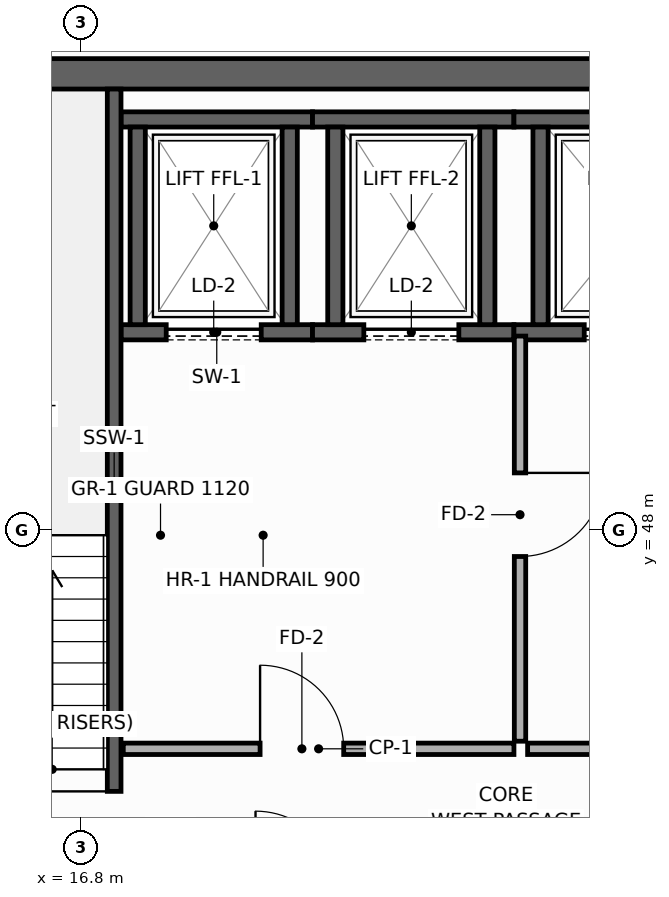
"""IFC4 building model, lengths in metres.
Left out: names, types, materials, properties, quantities, classifications, styles, units other than length and angle.
Written with IfcOpenShell. Run it as: python <this file> out.ifc"""

import sys

from ifc_helpers import new_model, si_unit, direction, frame, frame_2d, origin, place, context, subcontext, project, spatial, rectangle, extrude, element, fill, save


model = new_model("IFC4")
c1 = context("Model", 3, precision=1e-05, world=origin(), true_north=direction((0.0, 1.0)))
c2 = subcontext(c1, "Body", "Model", "MODEL_VIEW")
j1 = project(units=[si_unit("LENGTHUNIT", "METRE"), si_unit("PLANEANGLEUNIT", "RADIAN")], contexts=[c1])
p1 = place(None, origin())
s1 = spatial("IfcSite", under=j1, at=p1, CompositionType="ELEMENT")
p2 = place(p1, origin())
s2 = spatial("IfcBuilding", under=s1, at=p2, CompositionType="ELEMENT")
p3 = place(p2, frame((0.0, 0.0, 319.2)))
s3 = spatial("IfcBuildingStorey", under=s2, at=p3, CompositionType="ELEMENT", Elevation=319.2)
p4 = place(p3, frame((13.7, 54.0, 0.0), z_axis=(0.0, 0.0, 1.0), x_axis=(1.0, 0.0, 0.0)))
e1 = element("IfcWall", 1, at=p4, inside=s3, PredefinedType="SHEAR", context=c2, shape_type="SweptSolid", body=[
    extrude(rectangle(XDim=32.5, YDim=0.4, at=frame_2d((16.25, 0.0))), origin(), (0.0, 0.0, 1.0), 3.95),
])
p5 = place(p3, frame((17.33, 50.6, 0.0), z_axis=(0.0, 0.0, 1.0), x_axis=(1.0, 0.0, 0.0)))
e2 = element("IfcWall", 2, at=p5, inside=s3, PredefinedType="SHEAR", context=c2, shape_type="SweptSolid", body=[
    extrude(rectangle(XDim=2.52, YDim=0.2, at=frame_2d((1.26, 0.0))), origin(), (0.0, 0.0, 1.0), 3.95),
])
p6 = place(p5, frame((0.595, 0.0, 0.0)))
e3 = element("IfcOpeningElement", 3, at=p6, cuts=e2, PredefinedType="OPENING", context=c2, shape_type="SweptSolid", body=[
    extrude(rectangle(XDim=1.25, YDim=2.3, at=frame_2d((0.625, 1.15))), frame((0.0, 0.11, 0.0), z_axis=(0.0, -1.0, 0.0), x_axis=(1.0, 0.0, 0.0)), (0.0, 0.0, 1.0), 0.22),
])
p7 = place(p3, frame((17.33, 53.4, 0.0), z_axis=(0.0, 0.0, 1.0), x_axis=(1.0, 0.0, 0.0)))
e4 = element("IfcWall", 4, at=p7, inside=s3, PredefinedType="SHEAR", context=c2, shape_type="SweptSolid", body=[
    extrude(rectangle(XDim=2.52, YDim=0.2, at=frame_2d((1.26, 0.0))), origin(), (0.0, 0.0, 1.0), 3.95),
])
for number, where, z_axis, x_axis in (
    (5, (17.55, 50.7, 0.0), (0.0, 0.0, 1.0), (0.0, 1.0, 0.0)),
    (6, (19.55, 50.7, 0.0), (0.0, 0.0, 1.0), (0.0, 1.0, 0.0)),
):
    element("IfcWall", number, at=place(p3, frame(where, z_axis=z_axis, x_axis=x_axis)), inside=s3, PredefinedType="SHEAR", context=c2, shape_type="SweptSolid", body=[
        extrude(rectangle(XDim=2.6, YDim=0.2, at=frame_2d((1.3, 0.0))), origin(), (0.0, 0.0, 1.0), 3.95),
    ])
p8 = place(p3, frame((19.85, 50.6, 0.0), z_axis=(0.0, 0.0, 1.0), x_axis=(1.0, 0.0, 0.0)))
e7 = element("IfcWall", 7, at=p8, inside=s3, PredefinedType="SHEAR", context=c2, shape_type="SweptSolid", body=[
    extrude(rectangle(XDim=2.65, YDim=0.2, at=frame_2d((1.325, 0.0))), origin(), (0.0, 0.0, 1.0), 3.95),
])
p9 = place(p8, frame((0.675, 0.0, 0.0)))
e8 = element("IfcOpeningElement", 8, at=p9, cuts=e7, PredefinedType="OPENING", context=c2, shape_type="SweptSolid", body=[
    extrude(rectangle(XDim=1.25, YDim=2.3, at=frame_2d((0.625, 1.15))), frame((0.0, 0.11, 0.0), z_axis=(0.0, -1.0, 0.0), x_axis=(1.0, 0.0, 0.0)), (0.0, 0.0, 1.0), 0.22),
])
p10 = place(p3, frame((19.85, 53.4, 0.0), z_axis=(0.0, 0.0, 1.0), x_axis=(1.0, 0.0, 0.0)))
e9 = element("IfcWall", 9, at=p10, inside=s3, PredefinedType="SHEAR", context=c2, shape_type="SweptSolid", body=[
    extrude(rectangle(XDim=2.65, YDim=0.2, at=frame_2d((1.325, 0.0))), origin(), (0.0, 0.0, 1.0), 3.95),
])
for number, where, z_axis, x_axis in (
    (10, (20.15, 50.7, 0.0), (0.0, 0.0, 1.0), (0.0, 1.0, 0.0)),
    (11, (22.15, 50.7, 0.0), (0.0, 0.0, 1.0), (0.0, 1.0, 0.0)),
):
    element("IfcWall", number, at=place(p3, frame(where, z_axis=z_axis, x_axis=x_axis)), inside=s3, PredefinedType="SHEAR", context=c2, shape_type="SweptSolid", body=[
        extrude(rectangle(XDim=2.6, YDim=0.2, at=frame_2d((1.3, 0.0))), origin(), (0.0, 0.0, 1.0), 3.95),
    ])
p11 = place(p3, frame((22.5, 50.6, 0.0), z_axis=(0.0, 0.0, 1.0), x_axis=(1.0, 0.0, 0.0)))
e12 = element("IfcWall", 12, at=p11, inside=s3, PredefinedType="SHEAR", context=c2, shape_type="SweptSolid", body=[
    extrude(rectangle(XDim=2.85, YDim=0.2, at=frame_2d((1.425, 0.0))), origin(), (0.0, 0.0, 1.0), 3.95),
])
p12 = place(p11, frame((0.925, 0.0, 0.0)))
e13 = element("IfcOpeningElement", 13, at=p12, cuts=e12, PredefinedType="OPENING", context=c2, shape_type="SweptSolid", body=[
    extrude(rectangle(XDim=1.25, YDim=2.3, at=frame_2d((0.625, 1.15))), frame((0.0, 0.11, 0.0), z_axis=(0.0, -1.0, 0.0), x_axis=(1.0, 0.0, 0.0)), (0.0, 0.0, 1.0), 0.22),
])
p13 = place(p3, frame((22.5, 53.4, 0.0), z_axis=(0.0, 0.0, 1.0), x_axis=(1.0, 0.0, 0.0)))
e14 = element("IfcWall", 14, at=p13, inside=s3, PredefinedType="SHEAR", context=c2, shape_type="SweptSolid", body=[
    extrude(rectangle(XDim=2.85, YDim=0.2, at=frame_2d((1.425, 0.0))), origin(), (0.0, 0.0, 1.0), 3.95),
])
p14 = place(p3, frame((22.85, 50.7, 0.0), z_axis=(0.0, 0.0, 1.0), x_axis=(0.0, 1.0, 0.0)))
e15 = element("IfcWall", 15, at=p14, inside=s3, PredefinedType="SHEAR", context=c2, shape_type="SweptSolid", body=[
    extrude(rectangle(XDim=2.6, YDim=0.2, at=frame_2d((1.3, 0.0))), origin(), (0.0, 0.0, 1.0), 3.95),
])
p15 = place(p3, frame((17.24, 43.4, 0.0), z_axis=(0.0, 0.0, 1.0), x_axis=(0.0, 1.0, 0.0)))
e16 = element("IfcWall", 16, at=p15, inside=s3, PredefinedType="SHEAR", context=c2, shape_type="SweptSolid", body=[
    extrude(rectangle(XDim=10.4, YDim=0.18, at=frame_2d((5.2, 0.0))), origin(), (0.0, 0.0, 1.0), 3.95),
])
p16 = place(p15, frame((0.16, 0.0, 0.0)))
e17 = element("IfcOpeningElement", 17, at=p16, cuts=e16, PredefinedType="OPENING", context=c2, shape_type="SweptSolid", body=[
    extrude(rectangle(XDim=1.0, YDim=2.15, at=frame_2d((0.5, 1.075))), frame((0.0, 0.1, 0.0), z_axis=(0.0, -1.0, 0.0), x_axis=(1.0, 0.0, 0.0)), (0.0, 0.0, 1.0), 0.2),
])
p17 = place(p3, frame((17.36, 45.12, 0.0), z_axis=(0.0, 0.0, 1.0), x_axis=(1.0, 0.0, 0.0)))
e18 = element("IfcWall", 18, at=p17, inside=s3, PredefinedType="PARTITIONING", context=c2, shape_type="SweptSolid", body=[
    extrude(rectangle(XDim=5.14, YDim=0.15, at=frame_2d((2.57, 0.0))), origin(), (0.0, 0.0, 1.0), 3.95),
])
p18 = place(p17, frame((1.8, 0.0, 0.0)))
e19 = element("IfcOpeningElement", 19, at=p18, cuts=e18, PredefinedType="OPENING", context=c2, shape_type="SweptSolid", body=[
    extrude(rectangle(XDim=1.1, YDim=2.15, at=frame_2d((0.55, 1.075))), frame((0.0, 0.085, 0.0), z_axis=(0.0, -1.0, 0.0), x_axis=(1.0, 0.0, 0.0)), (0.0, 0.0, 1.0), 0.17),
])
p19 = place(p3, frame((22.58, 50.55, 0.0), z_axis=(0.0, 0.0, 1.0), x_axis=(0.0, -1.0, 0.0)))
e20 = element("IfcWall", 20, at=p19, inside=s3, PredefinedType="PARTITIONING", context=c2, shape_type="SweptSolid", body=[
    extrude(rectangle(XDim=5.33, YDim=0.15, at=frame_2d((2.665, 0.0))), origin(), (0.0, 0.0, 1.0), 3.95),
])
p20 = place(p19, frame((1.8, 0.0, 0.0)))
e21 = element("IfcOpeningElement", 21, at=p20, cuts=e20, PredefinedType="OPENING", context=c2, shape_type="SweptSolid", body=[
    extrude(rectangle(XDim=1.1, YDim=2.15, at=frame_2d((0.55, 1.075))), frame((0.0, 0.085, 0.0), z_axis=(0.0, -1.0, 0.0), x_axis=(1.0, 0.0, 0.0)), (0.0, 0.0, 1.0), 0.17),
])
p21 = place(p3, frame((22.68, 45.12, 0.0), z_axis=(0.0, 0.0, 1.0), x_axis=(1.0, 0.0, 0.0)))
e22 = element("IfcWall", 22, at=p21, inside=s3, PredefinedType="PARTITIONING", context=c2, shape_type="SweptSolid", body=[
    extrude(rectangle(XDim=2.92, YDim=0.15, at=frame_2d((1.46, 0.0))), origin(), (0.0, 0.0, 1.0), 3.95),
])
p22 = place(p21, frame((0.85, 0.0, 0.0)))
e23 = element("IfcOpeningElement", 23, at=p22, cuts=e22, PredefinedType="OPENING", context=c2, shape_type="SweptSolid", body=[
    extrude(rectangle(XDim=1.1, YDim=2.15, at=frame_2d((0.55, 1.075))), frame((0.0, 0.085, 0.0), z_axis=(0.0, -1.0, 0.0), x_axis=(1.0, 0.0, 0.0)), (0.0, 0.0, 1.0), 0.17),
])
p23 = place(p6, origin())
e24 = element("IfcDoor", 24, at=p23, inside=s3, OperationType="SLIDING_TO_LEFT", PredefinedType="DOOR", context=c2, shape_type="SweptSolid", body=[
    extrude(rectangle(XDim=1.25, YDim=2.3, at=frame_2d((0.625, 1.15))), frame((0.0, 0.025, 0.0), z_axis=(0.0, -1.0, 0.0), x_axis=(1.0, 0.0, 0.0)), (0.0, 0.0, 1.0), 0.05),
])
fill(e3, e24)
p24 = place(p9, origin())
e25 = element("IfcDoor", 25, at=p24, inside=s3, OperationType="SLIDING_TO_LEFT", PredefinedType="DOOR", context=c2, shape_type="SweptSolid", body=[
    extrude(rectangle(XDim=1.25, YDim=2.3, at=frame_2d((0.625, 1.15))), frame((0.0, 0.025, 0.0), z_axis=(0.0, -1.0, 0.0), x_axis=(1.0, 0.0, 0.0)), (0.0, 0.0, 1.0), 0.05),
])
fill(e8, e25)
p25 = place(p12, origin())
e26 = element("IfcDoor", 26, at=p25, inside=s3, OperationType="SLIDING_TO_LEFT", PredefinedType="DOOR", context=c2, shape_type="SweptSolid", body=[
    extrude(rectangle(XDim=1.25, YDim=2.3, at=frame_2d((0.625, 1.15))), frame((0.0, 0.025, 0.0), z_axis=(0.0, -1.0, 0.0), x_axis=(1.0, 0.0, 0.0)), (0.0, 0.0, 1.0), 0.05),
])
fill(e13, e26)
p26 = place(p16, origin())
e27 = element("IfcDoor", 27, at=p26, inside=s3, OperationType="SINGLE_SWING_RIGHT", PredefinedType="DOOR", context=c2, shape_type="SweptSolid", body=[
    extrude(rectangle(XDim=1.0, YDim=2.15, at=frame_2d((0.5, 1.075))), frame((0.0, 0.025, 0.0), z_axis=(0.0, -1.0, 0.0), x_axis=(1.0, 0.0, 0.0)), (0.0, 0.0, 1.0), 0.05),
])
fill(e17, e27)
p27 = place(p18, origin())
e28 = element("IfcDoor", 28, at=p27, inside=s3, OperationType="SINGLE_SWING_LEFT", PredefinedType="DOOR", context=c2, shape_type="SweptSolid", body=[
    extrude(rectangle(XDim=1.1, YDim=2.15, at=frame_2d((0.55, 1.075))), frame((0.0, 0.025, 0.0), z_axis=(0.0, -1.0, 0.0), x_axis=(1.0, 0.0, 0.0)), (0.0, 0.0, 1.0), 0.05),
])
fill(e19, e28)
p28 = place(p20, origin())
e29 = element("IfcDoor", 29, at=p28, inside=s3, OperationType="SINGLE_SWING_LEFT", PredefinedType="DOOR", context=c2, shape_type="SweptSolid", body=[
    extrude(rectangle(XDim=1.1, YDim=2.15, at=frame_2d((0.55, 1.075))), frame((0.0, 0.025, 0.0), z_axis=(0.0, -1.0, 0.0), x_axis=(1.0, 0.0, 0.0)), (0.0, 0.0, 1.0), 0.05),
])
fill(e21, e29)
save(model, sys.argv[1])
